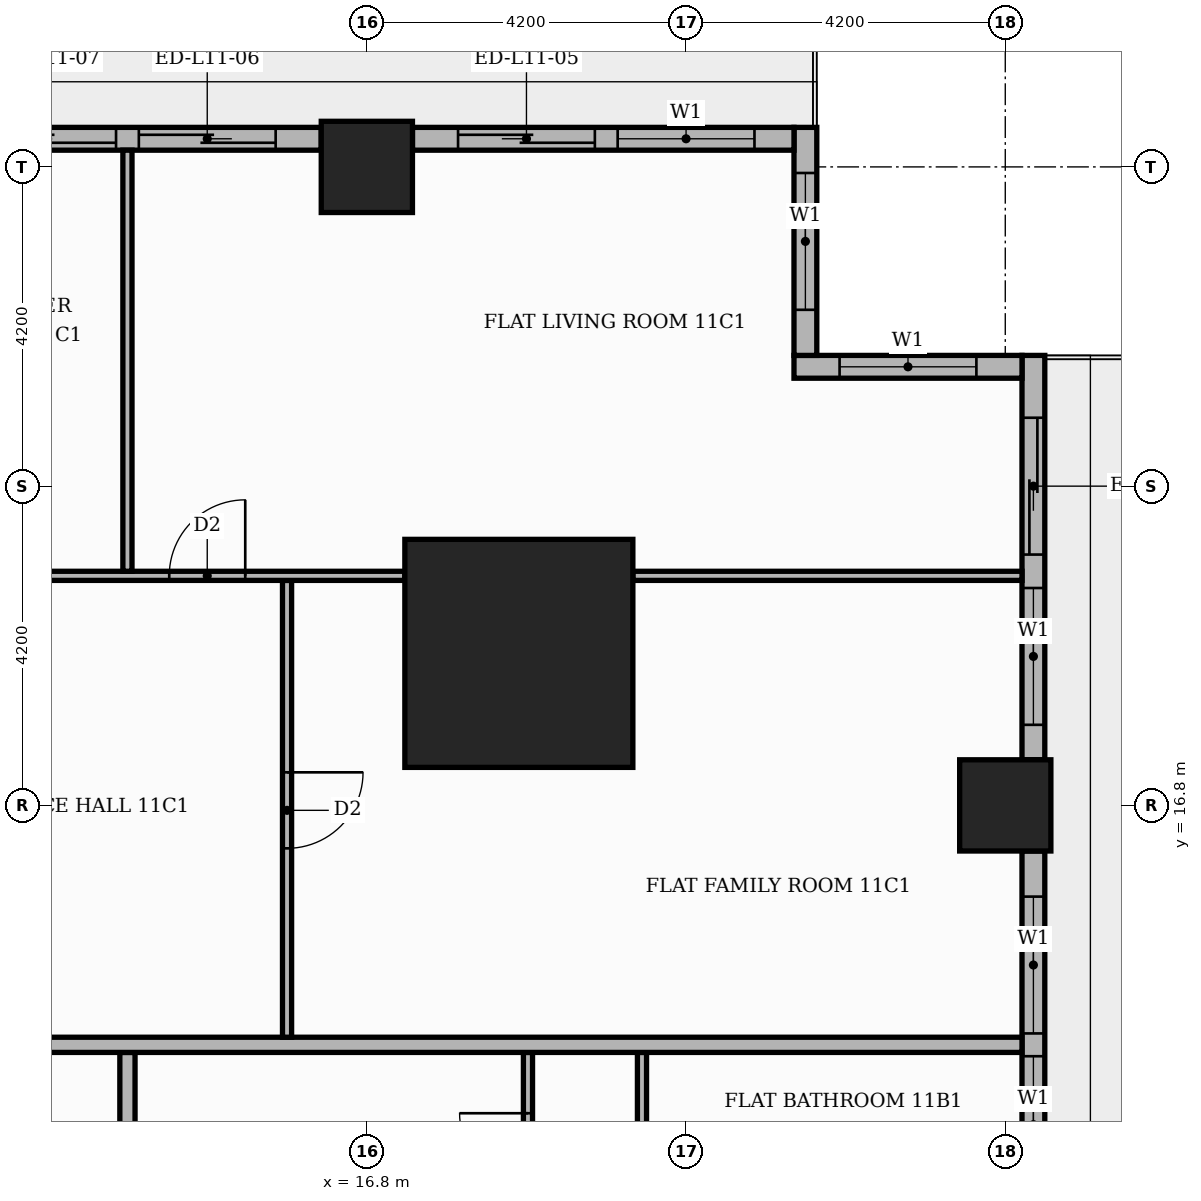
"""IFC4 building model, lengths in metres.
Left out: names, types, materials, properties, quantities, classifications, styles, units other than length and angle.
Written with IfcOpenShell. Run it as: python <this file> out.ifc"""

import sys

from ifc_helpers import new_model, si_unit, direction, frame, frame_2d, origin, origin_2d, place, context, subcontext, project, spatial, rectangle, extrude, element, fill, save


model = new_model("IFC4")
c1 = context("Model", 3, precision=1e-05, world=origin(), true_north=direction((0.0, 1.0)))
c2 = subcontext(c1, "Body", "Model", "MODEL_VIEW")
j1 = project(units=[si_unit("LENGTHUNIT", "METRE"), si_unit("PLANEANGLEUNIT", "RADIAN")], contexts=[c1])
p1 = place(None, origin())
s1 = spatial("IfcSite", under=j1, at=p1, CompositionType="ELEMENT")
p2 = place(p1, origin())
s2 = spatial("IfcBuilding", under=s1, at=p2, CompositionType="ELEMENT")
p3 = place(p2, frame((0.0, 0.0, 50.4)))
s3 = spatial("IfcBuildingStorey", under=s2, at=p3, CompositionType="ELEMENT", Elevation=50.4)
p4 = place(p3, frame((18.8, 18.8, 0.0), z_axis=(0.0, 0.0, 1.0), x_axis=(1.0, 0.0, 0.0)))
e1 = element("IfcColumn", 1, at=p4, inside=s3, PredefinedType="COLUMN", context=c2, shape_type="SweptSolid", body=[
    extrude(rectangle(XDim=3.0, YDim=3.0, at=origin_2d()), origin(), (0.0, 0.0, 1.0), 3.9),
])
for number, where, z_axis, x_axis in (
    (2, (25.2, 16.8, 0.0), (0.0, 0.0, 1.0), (1.0, 0.0, 0.0)),
    (3, (16.8, 25.2, 0.0), (0.0, 0.0, 1.0), (1.0, 0.0, 0.0)),
):
    element("IfcColumn", number, at=place(p3, frame(where, z_axis=z_axis, x_axis=x_axis)), inside=s3, PredefinedType="COLUMN", context=c2, shape_type="SweptSolid", body=[
        extrude(rectangle(XDim=1.2, YDim=1.2, at=origin_2d()), origin(), (0.0, 0.0, 1.0), 3.9),
    ])
p5 = place(p3, frame((25.57, 9.0, 0.0), z_axis=(0.0, 0.0, 1.0), x_axis=(0.0, 1.0, 0.0)))
e4 = element("IfcWall", 4, at=p5, inside=s3, PredefinedType="STANDARD", context=c2, shape_type="SweptSolid", body=[
    extrude(rectangle(XDim=7.2, YDim=0.3, at=frame_2d((3.6, 0.0))), origin(), (0.0, 0.0, 1.0), 3.48),
])
p6 = place(p5, frame((0.6, 0.0, 0.9)))
e5 = element("IfcOpeningElement", 5, at=p6, cuts=e4, PredefinedType="OPENING", context=c2, shape_type="SweptSolid", body=[
    extrude(rectangle(XDim=1.8, YDim=2.1, at=frame_2d((0.9, 1.05))), frame((0.0, 0.16, 0.0), z_axis=(0.0, -1.0, 0.0), x_axis=(1.0, 0.0, 0.0)), (0.0, 0.0, 1.0), 0.32),
])
p7 = place(p5, frame((2.7, 0.0, 0.9)))
e6 = element("IfcOpeningElement", 6, at=p7, cuts=e4, PredefinedType="OPENING", context=c2, shape_type="SweptSolid", body=[
    extrude(rectangle(XDim=1.8, YDim=2.1, at=frame_2d((0.9, 1.05))), frame((0.0, 0.16, 0.0), z_axis=(0.0, -1.0, 0.0), x_axis=(1.0, 0.0, 0.0)), (0.0, 0.0, 1.0), 0.32),
])
p8 = place(p5, frame((4.8, 0.0, 0.9)))
e7 = element("IfcOpeningElement", 7, at=p8, cuts=e4, PredefinedType="OPENING", context=c2, shape_type="SweptSolid", body=[
    extrude(rectangle(XDim=1.8, YDim=2.1, at=frame_2d((0.9, 1.05))), frame((0.0, 0.16, 0.0), z_axis=(0.0, -1.0, 0.0), x_axis=(1.0, 0.0, 0.0)), (0.0, 0.0, 1.0), 0.32),
])
p9 = place(p3, frame((25.57, 17.4, 0.0), z_axis=(0.0, 0.0, 1.0), x_axis=(0.0, 1.0, 0.0)))
e8 = element("IfcWall", 8, at=p9, inside=s3, PredefinedType="STANDARD", context=c2, shape_type="SweptSolid", body=[
    extrude(rectangle(XDim=5.32, YDim=0.3, at=frame_2d((2.66, 0.0))), origin(), (0.0, 0.0, 1.0), 3.48),
])
p10 = place(p9, frame((2.7, 0.0, 0.0)))
e9 = element("IfcOpeningElement", 9, at=p10, cuts=e8, PredefinedType="OPENING", context=c2, shape_type="SweptSolid", body=[
    extrude(rectangle(XDim=1.8, YDim=2.4, at=frame_2d((0.9, 1.2))), frame((0.0, 0.16, 0.0), z_axis=(0.0, -1.0, 0.0), x_axis=(1.0, 0.0, 0.0)), (0.0, 0.0, 1.0), 0.32),
])
p11 = place(p9, frame((0.46, 0.0, 0.9)))
e10 = element("IfcOpeningElement", 10, at=p11, cuts=e8, PredefinedType="OPENING", context=c2, shape_type="SweptSolid", body=[
    extrude(rectangle(XDim=1.8, YDim=2.1, at=frame_2d((0.9, 1.05))), frame((0.0, 0.16, 0.0), z_axis=(0.0, -1.0, 0.0), x_axis=(1.0, 0.0, 0.0)), (0.0, 0.0, 1.0), 0.32),
])
p12 = place(p3, frame((25.42, 22.57, 0.0), z_axis=(0.0, 0.0, 1.0), x_axis=(-1.0, 0.0, 0.0)))
e11 = element("IfcWall", 11, at=p12, inside=s3, PredefinedType="STANDARD", context=c2, shape_type="SweptSolid", body=[
    extrude(rectangle(XDim=3.0, YDim=0.3, at=frame_2d((1.5, 0.0))), origin(), (0.0, 0.0, 1.0), 3.48),
])
p13 = place(p12, frame((0.6, 0.0, 0.9)))
e12 = element("IfcOpeningElement", 12, at=p13, cuts=e11, PredefinedType="OPENING", context=c2, shape_type="SweptSolid", body=[
    extrude(rectangle(XDim=1.8, YDim=2.1, at=frame_2d((0.9, 1.05))), frame((0.0, 0.16, 0.0), z_axis=(0.0, -1.0, 0.0), x_axis=(1.0, 0.0, 0.0)), (0.0, 0.0, 1.0), 0.32),
])
p14 = place(p3, frame((22.57, 22.72, 0.0), z_axis=(0.0, 0.0, 1.0), x_axis=(0.0, 1.0, 0.0)))
e13 = element("IfcWall", 13, at=p14, inside=s3, PredefinedType="STANDARD", context=c2, shape_type="SweptSolid", body=[
    extrude(rectangle(XDim=3.0, YDim=0.3, at=frame_2d((1.5, 0.0))), origin(), (0.0, 0.0, 1.0), 3.48),
])
p15 = place(p14, frame((0.6, 0.0, 0.9)))
e14 = element("IfcOpeningElement", 14, at=p15, cuts=e13, PredefinedType="OPENING", context=c2, shape_type="SweptSolid", body=[
    extrude(rectangle(XDim=1.8, YDim=2.1, at=frame_2d((0.9, 1.05))), frame((0.0, 0.16, 0.0), z_axis=(0.0, -1.0, 0.0), x_axis=(1.0, 0.0, 0.0)), (0.0, 0.0, 1.0), 0.32),
])
p16 = place(p3, frame((22.42, 25.57, 0.0), z_axis=(0.0, 0.0, 1.0), x_axis=(-1.0, 0.0, 0.0)))
e15 = element("IfcWall", 15, at=p16, inside=s3, PredefinedType="STANDARD", context=c2, shape_type="SweptSolid", body=[
    extrude(rectangle(XDim=5.02, YDim=0.3, at=frame_2d((2.51, 0.0))), origin(), (0.0, 0.0, 1.0), 3.48),
])
p17 = place(p16, frame((0.52, 0.0, 0.9)))
e16 = element("IfcOpeningElement", 16, at=p17, cuts=e15, PredefinedType="OPENING", context=c2, shape_type="SweptSolid", body=[
    extrude(rectangle(XDim=1.8, YDim=2.1, at=frame_2d((0.9, 1.05))), frame((0.0, 0.16, 0.0), z_axis=(0.0, -1.0, 0.0), x_axis=(1.0, 0.0, 0.0)), (0.0, 0.0, 1.0), 0.32),
])
p18 = place(p16, frame((2.62, 0.0, 0.0)))
e17 = element("IfcOpeningElement", 17, at=p18, cuts=e15, PredefinedType="OPENING", context=c2, shape_type="SweptSolid", body=[
    extrude(rectangle(XDim=1.8, YDim=2.4, at=frame_2d((0.9, 1.2))), frame((0.0, 0.16, 0.0), z_axis=(0.0, -1.0, 0.0), x_axis=(1.0, 0.0, 0.0)), (0.0, 0.0, 1.0), 0.32),
])
p19 = place(p3, frame((16.2, 25.57, 0.0), z_axis=(0.0, 0.0, 1.0), x_axis=(-1.0, 0.0, 0.0)))
e18 = element("IfcWall", 18, at=p19, inside=s3, PredefinedType="STANDARD", context=c2, shape_type="SweptSolid", body=[
    extrude(rectangle(XDim=7.2, YDim=0.3, at=frame_2d((3.6, 0.0))), origin(), (0.0, 0.0, 1.0), 3.48),
])
p20 = place(p19, frame((0.6, 0.0, 0.0)))
e19 = element("IfcOpeningElement", 19, at=p20, cuts=e18, PredefinedType="OPENING", context=c2, shape_type="SweptSolid", body=[
    extrude(rectangle(XDim=1.8, YDim=2.4, at=frame_2d((0.9, 1.2))), frame((0.0, 0.16, 0.0), z_axis=(0.0, -1.0, 0.0), x_axis=(1.0, 0.0, 0.0)), (0.0, 0.0, 1.0), 0.32),
])
p21 = place(p19, frame((2.7, 0.0, 0.0)))
e20 = element("IfcOpeningElement", 20, at=p21, cuts=e18, PredefinedType="OPENING", context=c2, shape_type="SweptSolid", body=[
    extrude(rectangle(XDim=1.8, YDim=2.4, at=frame_2d((0.9, 1.2))), frame((0.0, 0.16, 0.0), z_axis=(0.0, -1.0, 0.0), x_axis=(1.0, 0.0, 0.0)), (0.0, 0.0, 1.0), 0.32),
])
p22 = place(p19, frame((4.8, 0.0, 0.9)))
e21 = element("IfcOpeningElement", 21, at=p22, cuts=e18, PredefinedType="OPENING", context=c2, shape_type="SweptSolid", body=[
    extrude(rectangle(XDim=1.8, YDim=2.1, at=frame_2d((0.9, 1.05))), frame((0.0, 0.16, 0.0), z_axis=(0.0, -1.0, 0.0), x_axis=(1.0, 0.0, 0.0)), (0.0, 0.0, 1.0), 0.32),
])
p23 = place(p3, frame((13.65, -13.55, 0.0), z_axis=(0.0, 0.0, 1.0), x_axis=(0.0, 1.0, 0.0)))
e22 = element("IfcWall", 22, at=p23, inside=s3, PredefinedType="PARTITIONING", context=c2, shape_type="SweptSolid", body=[
    extrude(rectangle(XDim=27.1, YDim=0.2, at=frame_2d((13.55, 0.0))), origin(), (0.0, 0.0, 1.0), 3.48),
])
p24 = place(p23, frame((1.45, 0.0, 0.0)))
e23 = element("IfcOpeningElement", 23, at=p24, cuts=e22, PredefinedType="OPENING", context=c2, shape_type="SweptSolid", body=[
    extrude(rectangle(XDim=1.1, YDim=2.4, at=frame_2d((0.55, 1.2))), frame((0.0, 0.11, 0.0), z_axis=(0.0, -1.0, 0.0), x_axis=(1.0, 0.0, 0.0)), (0.0, 0.0, 1.0), 0.22),
])
p25 = place(p3, frame((18.92, 11.01, 0.0), z_axis=(0.0, 0.0, 1.0), x_axis=(0.0, 1.0, 0.0)))
e24 = element("IfcWall", 24, at=p25, inside=s3, PredefinedType="PARTITIONING", context=c2, shape_type="SweptSolid", body=[
    extrude(rectangle(XDim=2.54, YDim=0.12, at=frame_2d((1.27, 0.0))), origin(), (0.0, 0.0, 1.0), 3.48),
])
p26 = place(p25, frame((0.84, 0.0, 0.0)))
e25 = element("IfcOpeningElement", 25, at=p26, cuts=e24, PredefinedType="OPENING", context=c2, shape_type="SweptSolid", body=[
    extrude(rectangle(XDim=0.9, YDim=2.1, at=frame_2d((0.45, 1.05))), frame((0.0, 0.07, 0.0), z_axis=(0.0, -1.0, 0.0), x_axis=(1.0, 0.0, 0.0)), (0.0, 0.0, 1.0), 0.14),
])
p27 = place(p3, frame((20.42, 11.61, 0.0), z_axis=(0.0, 0.0, 1.0), x_axis=(0.0, 1.0, 0.0)))
e26 = element("IfcWall", 26, at=p27, inside=s3, PredefinedType="PARTITIONING", context=c2, shape_type="SweptSolid", body=[
    extrude(rectangle(XDim=1.94, YDim=0.12, at=frame_2d((0.97, 0.0))), origin(), (0.0, 0.0, 1.0), 3.48),
])
p28 = place(p3, frame((-13.65, 13.65, 0.0), z_axis=(0.0, 0.0, 1.0), x_axis=(1.0, 0.0, 0.0)))
e27 = element("IfcWall", 27, at=p28, inside=s3, PredefinedType="PARTITIONING", context=c2, shape_type="SweptSolid", body=[
    extrude(rectangle(XDim=39.07, YDim=0.2, at=frame_2d((19.535, 0.0))), origin(), (0.0, 0.0, 1.0), 3.48),
])
p29 = place(p28, frame((24.65, 0.0, 0.0)))
e28 = element("IfcOpeningElement", 28, at=p29, cuts=e27, PredefinedType="OPENING", context=c2, shape_type="SweptSolid", body=[
    extrude(rectangle(XDim=1.1, YDim=2.4, at=frame_2d((0.55, 1.2))), frame((0.0, 0.11, 0.0), z_axis=(0.0, -1.0, 0.0), x_axis=(1.0, 0.0, 0.0)), (0.0, 0.0, 1.0), 0.22),
])
p30 = place(p28, frame((14.15, 0.0, 0.0)))
e29 = element("IfcOpeningElement", 29, at=p30, cuts=e27, PredefinedType="OPENING", context=c2, shape_type="SweptSolid", body=[
    extrude(rectangle(XDim=1.1, YDim=2.4, at=frame_2d((0.55, 1.2))), frame((0.0, 0.11, 0.0), z_axis=(0.0, -1.0, 0.0), x_axis=(1.0, 0.0, 0.0)), (0.0, 0.0, 1.0), 0.22),
])
p31 = place(p3, frame((15.75, 13.75, 0.0), z_axis=(0.0, 0.0, 1.0), x_axis=(0.0, 1.0, 0.0)))
e30 = element("IfcWall", 30, at=p31, inside=s3, PredefinedType="PARTITIONING", context=c2, shape_type="SweptSolid", body=[
    extrude(rectangle(XDim=6.01, YDim=0.12, at=frame_2d((3.005, 0.0))), origin(), (0.0, 0.0, 1.0), 3.48),
])
p32 = place(p31, frame((2.485, 0.0, 0.0)))
e31 = element("IfcOpeningElement", 31, at=p32, cuts=e30, PredefinedType="OPENING", context=c2, shape_type="SweptSolid", body=[
    extrude(rectangle(XDim=1.0, YDim=2.1, at=frame_2d((0.5, 1.05))), frame((0.0, 0.07, 0.0), z_axis=(0.0, -1.0, 0.0), x_axis=(1.0, 0.0, 0.0)), (0.0, 0.0, 1.0), 0.14),
])
p33 = place(p3, frame((5.35, 19.82, 0.0), z_axis=(0.0, 0.0, 1.0), x_axis=(1.0, 0.0, 0.0)))
e32 = element("IfcWall", 32, at=p33, inside=s3, PredefinedType="PARTITIONING", context=c2, shape_type="SweptSolid", body=[
    extrude(rectangle(XDim=11.95, YDim=0.12, at=frame_2d((5.975, 0.0))), origin(), (0.0, 0.0, 1.0), 3.48),
])
p34 = place(p33, frame((8.85, 0.0, 0.0)))
e33 = element("IfcOpeningElement", 33, at=p34, cuts=e32, PredefinedType="OPENING", context=c2, shape_type="SweptSolid", body=[
    extrude(rectangle(XDim=1.0, YDim=2.1, at=frame_2d((0.5, 1.05))), frame((0.0, 0.07, 0.0), z_axis=(0.0, -1.0, 0.0), x_axis=(1.0, 0.0, 0.0)), (0.0, 0.0, 1.0), 0.14),
])
p35 = place(p33, frame((5.75, 0.0, 0.0)))
e34 = element("IfcOpeningElement", 34, at=p35, cuts=e32, PredefinedType="OPENING", context=c2, shape_type="SweptSolid", body=[
    extrude(rectangle(XDim=0.9, YDim=2.1, at=frame_2d((0.45, 1.05))), frame((0.0, 0.07, 0.0), z_axis=(0.0, -1.0, 0.0), x_axis=(1.0, 0.0, 0.0)), (0.0, 0.0, 1.0), 0.14),
])
p36 = place(p3, frame((20.3, 19.82, 0.0), z_axis=(0.0, 0.0, 1.0), x_axis=(1.0, 0.0, 0.0)))
e35 = element("IfcWall", 35, at=p36, inside=s3, PredefinedType="PARTITIONING", context=c2, shape_type="SweptSolid", body=[
    extrude(rectangle(XDim=5.12, YDim=0.12, at=frame_2d((2.56, 0.0))), origin(), (0.0, 0.0, 1.0), 3.48),
])
p37 = place(p3, frame((13.65, 19.88, 0.0), z_axis=(0.0, 0.0, 1.0), x_axis=(0.0, 1.0, 0.0)))
e36 = element("IfcWall", 36, at=p37, inside=s3, PredefinedType="PARTITIONING", context=c2, shape_type="SweptSolid", body=[
    extrude(rectangle(XDim=5.54, YDim=0.12, at=frame_2d((2.77, 0.0))), origin(), (0.0, 0.0, 1.0), 3.48),
])
p38 = place(p7, origin())
e37 = element("IfcWindow", 37, at=p38, inside=s3, PartitioningType="SINGLE_PANEL", PredefinedType="WINDOW", context=c2, shape_type="SweptSolid", body=[
    extrude(rectangle(XDim=1.8, YDim=2.1, at=frame_2d((0.9, 1.05))), frame((0.0, 0.03, 0.0), z_axis=(0.0, -1.0, 0.0), x_axis=(1.0, 0.0, 0.0)), (0.0, 0.0, 1.0), 0.06),
])
fill(e6, e37)
p39 = place(p8, origin())
e38 = element("IfcWindow", 38, at=p39, inside=s3, PartitioningType="SINGLE_PANEL", PredefinedType="WINDOW", context=c2, shape_type="SweptSolid", body=[
    extrude(rectangle(XDim=1.8, YDim=2.1, at=frame_2d((0.9, 1.05))), frame((0.0, 0.03, 0.0), z_axis=(0.0, -1.0, 0.0), x_axis=(1.0, 0.0, 0.0)), (0.0, 0.0, 1.0), 0.06),
])
fill(e7, e38)
p40 = place(p10, origin())
e39 = element("IfcDoor", 39, at=p40, inside=s3, OperationType="SLIDING_TO_LEFT", PredefinedType="DOOR", context=c2, shape_type="SweptSolid", body=[
    extrude(rectangle(XDim=1.8, YDim=2.4, at=frame_2d((0.9, 1.2))), frame((0.0, 0.025, 0.0), z_axis=(0.0, -1.0, 0.0), x_axis=(1.0, 0.0, 0.0)), (0.0, 0.0, 1.0), 0.05),
])
fill(e9, e39)
p41 = place(p11, origin())
e40 = element("IfcWindow", 40, at=p41, inside=s3, PartitioningType="SINGLE_PANEL", PredefinedType="WINDOW", context=c2, shape_type="SweptSolid", body=[
    extrude(rectangle(XDim=1.8, YDim=2.1, at=frame_2d((0.9, 1.05))), frame((0.0, 0.03, 0.0), z_axis=(0.0, -1.0, 0.0), x_axis=(1.0, 0.0, 0.0)), (0.0, 0.0, 1.0), 0.06),
])
fill(e10, e40)
p42 = place(p13, origin())
e41 = element("IfcWindow", 41, at=p42, inside=s3, PartitioningType="SINGLE_PANEL", PredefinedType="WINDOW", context=c2, shape_type="SweptSolid", body=[
    extrude(rectangle(XDim=1.8, YDim=2.1, at=frame_2d((0.9, 1.05))), frame((0.0, 0.03, 0.0), z_axis=(0.0, -1.0, 0.0), x_axis=(1.0, 0.0, 0.0)), (0.0, 0.0, 1.0), 0.06),
])
fill(e12, e41)
p43 = place(p15, origin())
e42 = element("IfcWindow", 42, at=p43, inside=s3, PartitioningType="SINGLE_PANEL", PredefinedType="WINDOW", context=c2, shape_type="SweptSolid", body=[
    extrude(rectangle(XDim=1.8, YDim=2.1, at=frame_2d((0.9, 1.05))), frame((0.0, 0.03, 0.0), z_axis=(0.0, -1.0, 0.0), x_axis=(1.0, 0.0, 0.0)), (0.0, 0.0, 1.0), 0.06),
])
fill(e14, e42)
p44 = place(p17, origin())
e43 = element("IfcWindow", 43, at=p44, inside=s3, PartitioningType="SINGLE_PANEL", PredefinedType="WINDOW", context=c2, shape_type="SweptSolid", body=[
    extrude(rectangle(XDim=1.8, YDim=2.1, at=frame_2d((0.9, 1.05))), frame((0.0, 0.03, 0.0), z_axis=(0.0, -1.0, 0.0), x_axis=(1.0, 0.0, 0.0)), (0.0, 0.0, 1.0), 0.06),
])
fill(e16, e43)
p45 = place(p18, origin())
e44 = element("IfcDoor", 44, at=p45, inside=s3, OperationType="SLIDING_TO_RIGHT", PredefinedType="DOOR", context=c2, shape_type="SweptSolid", body=[
    extrude(rectangle(XDim=1.8, YDim=2.4, at=frame_2d((0.9, 1.2))), frame((0.0, 0.025, 0.0), z_axis=(0.0, -1.0, 0.0), x_axis=(1.0, 0.0, 0.0)), (0.0, 0.0, 1.0), 0.05),
])
fill(e17, e44)
p46 = place(p20, origin())
e45 = element("IfcDoor", 45, at=p46, inside=s3, OperationType="SLIDING_TO_LEFT", PredefinedType="DOOR", context=c2, shape_type="SweptSolid", body=[
    extrude(rectangle(XDim=1.8, YDim=2.4, at=frame_2d((0.9, 1.2))), frame((0.0, 0.025, 0.0), z_axis=(0.0, -1.0, 0.0), x_axis=(1.0, 0.0, 0.0)), (0.0, 0.0, 1.0), 0.05),
])
fill(e19, e45)
p47 = place(p21, origin())
e46 = element("IfcDoor", 46, at=p47, inside=s3, OperationType="SLIDING_TO_RIGHT", PredefinedType="DOOR", context=c2, shape_type="SweptSolid", body=[
    extrude(rectangle(XDim=1.8, YDim=2.4, at=frame_2d((0.9, 1.2))), frame((0.0, 0.025, 0.0), z_axis=(0.0, -1.0, 0.0), x_axis=(1.0, 0.0, 0.0)), (0.0, 0.0, 1.0), 0.05),
])
fill(e20, e46)
p48 = place(p26, origin())
e47 = element("IfcDoor", 47, at=p48, inside=s3, OperationType="SINGLE_SWING_RIGHT", PredefinedType="DOOR", context=c2, shape_type="SweptSolid", body=[
    extrude(rectangle(XDim=0.9, YDim=2.1, at=frame_2d((0.45, 1.05))), frame((0.0, 0.025, 0.0), z_axis=(0.0, -1.0, 0.0), x_axis=(1.0, 0.0, 0.0)), (0.0, 0.0, 1.0), 0.05),
])
fill(e25, e47)
p49 = place(p32, frame((1.0, 0.0, 0.0), z_axis=(0.0, 0.0, 1.0), x_axis=(-1.0, 0.0, 0.0)))
e48 = element("IfcDoor", 48, at=p49, inside=s3, OperationType="SINGLE_SWING_RIGHT", PredefinedType="DOOR", context=c2, shape_type="SweptSolid", body=[
    extrude(rectangle(XDim=1.0, YDim=2.1, at=frame_2d((0.5, 1.05))), frame((0.0, 0.025, 0.0), z_axis=(0.0, -1.0, 0.0), x_axis=(1.0, 0.0, 0.0)), (0.0, 0.0, 1.0), 0.05),
])
fill(e31, e48)
p50 = place(p34, origin())
e49 = element("IfcDoor", 49, at=p50, inside=s3, OperationType="SINGLE_SWING_RIGHT", PredefinedType="DOOR", context=c2, shape_type="SweptSolid", body=[
    extrude(rectangle(XDim=1.0, YDim=2.1, at=frame_2d((0.5, 1.05))), frame((0.0, 0.025, 0.0), z_axis=(0.0, -1.0, 0.0), x_axis=(1.0, 0.0, 0.0)), (0.0, 0.0, 1.0), 0.05),
])
fill(e33, e49)
save(model, sys.argv[1])
